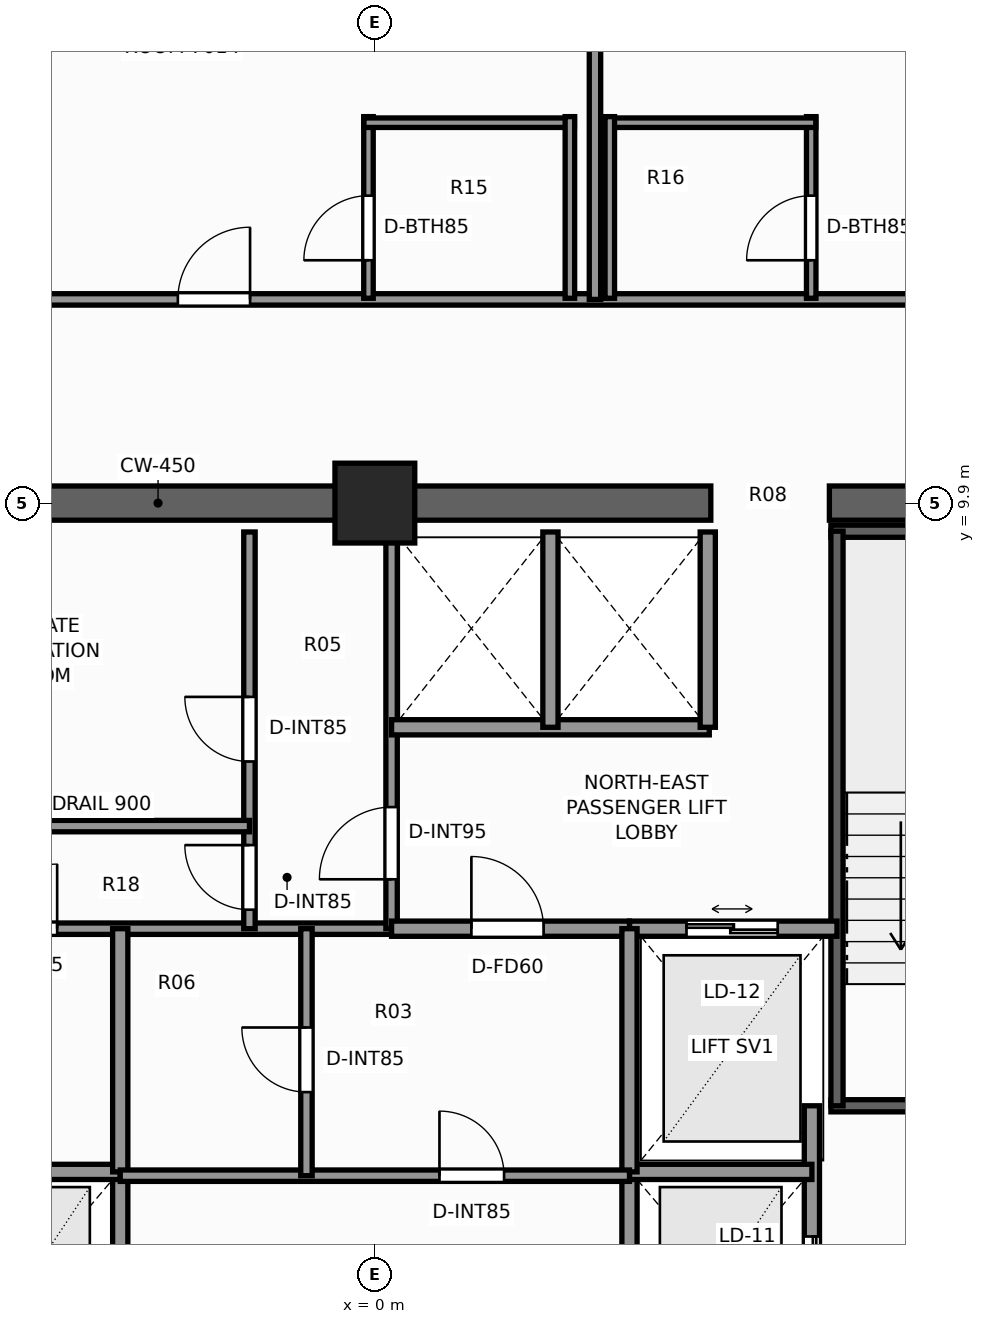
"""IFC4 building model, lengths in metres.
Left out: names, types, materials, properties, quantities, classifications, styles, units other than length and angle.
Written with IfcOpenShell. Run it as: python <this file> out.ifc"""

import sys

from ifc_helpers import new_model, si_unit, direction, frame, frame_2d, origin, origin_2d, place, context, subcontext, project, spatial, rectangle, extrude, element, fill, save


model = new_model("IFC4")
c1 = context("Model", 3, precision=1e-05, world=origin(), true_north=direction((0.0, 1.0)))
c2 = subcontext(c1, "Body", "Model", "MODEL_VIEW")
j1 = project(units=[si_unit("LENGTHUNIT", "METRE"), si_unit("PLANEANGLEUNIT", "RADIAN")], contexts=[c1])
p1 = place(None, origin())
s1 = spatial("IfcSite", under=j1, at=p1, CompositionType="ELEMENT")
p2 = place(p1, origin())
s2 = spatial("IfcBuilding", under=s1, at=p2, CompositionType="ELEMENT")
p3 = place(p2, frame((0.0, 0.0, 240.9)))
s3 = spatial("IfcBuildingStorey", under=s2, at=p3, CompositionType="ELEMENT", Elevation=240.9)
p4 = place(p3, frame((-10.125, 9.9, 0.0), z_axis=(0.0, 0.0, 1.0), x_axis=(1.0, 0.0, 0.0)))
e1 = element("IfcWall", 1, at=p4, inside=s3, PredefinedType="SHEAR", context=c2, shape_type="SweptSolid", body=[
    extrude(rectangle(XDim=14.545, YDim=0.45, at=frame_2d((7.272, 0.0))), origin(), (0.0, 0.0, 1.0), 3.5),
])
p5 = place(p3, frame((5.98, 9.9, 0.0), z_axis=(0.0, 0.0, 1.0), x_axis=(1.0, 0.0, 0.0)))
e2 = element("IfcWall", 2, at=p5, inside=s3, PredefinedType="SHEAR", context=c2, shape_type="SweptSolid", body=[
    extrude(rectangle(XDim=4.145, YDim=0.45, at=frame_2d((2.073, 0.0))), origin(), (0.0, 0.0, 1.0), 3.5),
])
p6 = place(p3, frame((0.0, 9.9, 0.0), z_axis=(0.0, 0.0, 1.0), x_axis=(1.0, 0.0, 0.0)))
e3 = element("IfcColumn", 3, at=p6, inside=s3, PredefinedType="COLUMN", context=c2, shape_type="SweptSolid", body=[
    extrude(rectangle(XDim=1.05, YDim=1.05, at=origin_2d()), origin(), (0.0, 0.0, 1.0), 3.5),
])
p7 = place(p3, frame((6.0, 1.97, 0.0), z_axis=(0.0, 0.0, 1.0), x_axis=(1.0, 0.0, 0.0)))
e4 = element("IfcWall", 4, at=p7, inside=s3, PredefinedType="SHEAR", context=c2, shape_type="SweptSolid", body=[
    extrude(rectangle(XDim=3.52, YDim=0.16, at=frame_2d((1.76, 0.0))), origin(), (0.0, 0.0, 1.0), 3.5),
])
p8 = place(p7, frame((1.15, 0.0, 0.0)))
e5 = element("IfcOpeningElement", 5, at=p8, cuts=e4, PredefinedType="OPENING", context=c2, shape_type="SweptSolid", body=[
    extrude(rectangle(XDim=1.1, YDim=2.2, at=frame_2d((0.55, 1.1))), frame((0.0, 0.09, 0.0), z_axis=(0.0, -1.0, 0.0), x_axis=(1.0, 0.0, 0.0)), (0.0, 0.0, 1.0), 0.18),
])
p9 = place(p3, frame((6.0, 9.53, 0.0), z_axis=(0.0, 0.0, 1.0), x_axis=(1.0, 0.0, 0.0)))
e6 = element("IfcWall", 6, at=p9, inside=s3, PredefinedType="SHEAR", context=c2, shape_type="SweptSolid", body=[
    extrude(rectangle(XDim=3.52, YDim=0.16, at=frame_2d((1.76, 0.0))), origin(), (0.0, 0.0, 1.0), 3.5),
])
p10 = place(p3, frame((6.08, 1.97, 0.0), z_axis=(0.0, 0.0, 1.0), x_axis=(0.0, 1.0, 0.0)))
e7 = element("IfcWall", 7, at=p10, inside=s3, PredefinedType="SHEAR", context=c2, shape_type="SweptSolid", body=[
    extrude(rectangle(XDim=7.56, YDim=0.16, at=frame_2d((3.78, 0.0))), origin(), (0.0, 0.0, 1.0), 3.5),
])
p11 = place(p3, frame((-3.35, -1.7, 0.0), z_axis=(0.0, 0.0, 1.0), x_axis=(0.0, 1.0, 0.0)))
e8 = element("IfcWall", 8, at=p11, inside=s3, PredefinedType="SOLIDWALL", context=c2, shape_type="SweptSolid", body=[
    extrude(rectangle(XDim=2.8, YDim=0.2, at=frame_2d((1.4, 0.0))), origin(), (0.0, 0.0, 1.0), 3.25),
])
p12 = place(p3, frame((-5.75, 1.1, 0.0), z_axis=(0.0, 0.0, 1.0), x_axis=(1.0, 0.0, 0.0)))
e9 = element("IfcWall", 9, at=p12, inside=s3, PredefinedType="SOLIDWALL", context=c2, shape_type="SweptSolid", body=[
    extrude(rectangle(XDim=2.4, YDim=0.2, at=frame_2d((1.2, 0.0))), origin(), (0.0, 0.0, 1.0), 3.25),
])
p13 = place(p3, frame((5.75, -3.6, 0.0), z_axis=(0.0, 0.0, 1.0), x_axis=(0.0, 1.0, 0.0)))
e10 = element("IfcWall", 10, at=p13, inside=s3, PredefinedType="SOLIDWALL", context=c2, shape_type="SweptSolid", body=[
    extrude(rectangle(XDim=5.57, YDim=0.2, at=frame_2d((2.785, 0.0))), origin(), (0.0, 0.0, 1.0), 3.25),
])
p14 = place(p13, frame((2.75, 0.0, 0.0)))
e11 = element("IfcOpeningElement", 11, at=p14, cuts=e10, PredefinedType="OPENING", context=c2, shape_type="SweptSolid", body=[
    extrude(rectangle(XDim=1.1, YDim=2.2, at=frame_2d((0.55, 1.1))), frame((0.0, 0.11, 0.0), z_axis=(0.0, -1.0, 0.0), x_axis=(1.0, 0.0, 0.0)), (0.0, 0.0, 1.0), 0.22),
])
p15 = place(p3, frame((3.35, -1.7, 0.0), z_axis=(0.0, 0.0, 1.0), x_axis=(0.0, 1.0, 0.0)))
e12 = element("IfcWall", 12, at=p15, inside=s3, PredefinedType="SOLIDWALL", context=c2, shape_type="SweptSolid", body=[
    extrude(rectangle(XDim=2.8, YDim=0.2, at=frame_2d((1.4, 0.0))), origin(), (0.0, 0.0, 1.0), 3.25),
])
p16 = place(p3, frame((3.35, 1.1, 0.0), z_axis=(0.0, 0.0, 1.0), x_axis=(1.0, 0.0, 0.0)))
e13 = element("IfcWall", 13, at=p16, inside=s3, PredefinedType="SOLIDWALL", context=c2, shape_type="SweptSolid", body=[
    extrude(rectangle(XDim=2.4, YDim=0.2, at=frame_2d((1.2, 0.0))), origin(), (0.0, 0.0, 1.0), 3.25),
])
p17 = place(p3, frame((3.35, 4.3, 0.0), z_axis=(0.0, 0.0, 1.0), x_axis=(1.0, 0.0, 0.0)))
e14 = element("IfcWall", 14, at=p17, inside=s3, PredefinedType="SOLIDWALL", context=c2, shape_type="SweptSolid", body=[
    extrude(rectangle(XDim=2.73, YDim=0.2, at=frame_2d((1.365, 0.0))), origin(), (0.0, 0.0, 1.0), 3.25),
])
p18 = place(p17, frame((0.75, 0.0, 0.0)))
e15 = element("IfcOpeningElement", 15, at=p18, cuts=e14, PredefinedType="OPENING", context=c2, shape_type="SweptSolid", body=[
    extrude(rectangle(XDim=1.2, YDim=2.25, at=frame_2d((0.6, 1.125))), frame((0.0, 0.11, 0.0), z_axis=(0.0, -1.0, 0.0), x_axis=(1.0, 0.0, 0.0)), (0.0, 0.0, 1.0), 0.22),
])
p19 = place(p3, frame((-6.08, 4.3, 0.0), z_axis=(0.0, 0.0, 1.0), x_axis=(1.0, 0.0, 0.0)))
e16 = element("IfcWall", 16, at=p19, inside=s3, PredefinedType="PARTITIONING", context=c2, shape_type="SweptSolid", body=[
    extrude(rectangle(XDim=6.3, YDim=0.15, at=frame_2d((3.15, 0.0))), origin(), (0.0, 0.0, 1.0), 3.25),
])
p20 = place(p19, frame((1.05, 0.0, 0.0)))
e17 = element("IfcOpeningElement", 17, at=p20, cuts=e16, PredefinedType="OPENING", context=c2, shape_type="SweptSolid", body=[
    extrude(rectangle(XDim=0.85, YDim=2.03, at=frame_2d((0.425, 1.015))), frame((0.0, 0.085, 0.0), z_axis=(0.0, -1.0, 0.0), x_axis=(1.0, 0.0, 0.0)), (0.0, 0.0, 1.0), 0.17),
])
p21 = place(p3, frame((0.22, 4.3, 0.0), z_axis=(0.0, 0.0, 1.0), x_axis=(0.0, 1.0, 0.0)))
e18 = element("IfcWall", 18, at=p21, inside=s3, PredefinedType="PARTITIONING", context=c2, shape_type="SweptSolid", body=[
    extrude(rectangle(XDim=5.22, YDim=0.15, at=frame_2d((2.61, 0.0))), origin(), (0.0, 0.0, 1.0), 3.25),
])
p22 = place(p21, frame((0.65, 0.0, 0.0)))
e19 = element("IfcOpeningElement", 19, at=p22, cuts=e18, PredefinedType="OPENING", context=c2, shape_type="SweptSolid", body=[
    extrude(rectangle(XDim=0.95, YDim=2.06, at=frame_2d((0.475, 1.03))), frame((0.0, 0.085, 0.0), z_axis=(0.0, -1.0, 0.0), x_axis=(1.0, 0.0, 0.0)), (0.0, 0.0, 1.0), 0.17),
])
p23 = place(p3, frame((-1.65, 4.3, 0.0), z_axis=(0.0, 0.0, 1.0), x_axis=(0.0, 1.0, 0.0)))
e20 = element("IfcWall", 20, at=p23, inside=s3, PredefinedType="PARTITIONING", context=c2, shape_type="SweptSolid", body=[
    extrude(rectangle(XDim=5.22, YDim=0.15, at=frame_2d((2.61, 0.0))), origin(), (0.0, 0.0, 1.0), 3.25),
])
p24 = place(p23, frame((2.2, 0.0, 0.0)))
e21 = element("IfcOpeningElement", 21, at=p24, cuts=e20, PredefinedType="OPENING", context=c2, shape_type="SweptSolid", body=[
    extrude(rectangle(XDim=0.85, YDim=2.03, at=frame_2d((0.425, 1.015))), frame((0.0, 0.085, 0.0), z_axis=(0.0, -1.0, 0.0), x_axis=(1.0, 0.0, 0.0)), (0.0, 0.0, 1.0), 0.17),
])
p25 = place(p23, frame((0.25, 0.0, 0.0)))
e22 = element("IfcOpeningElement", 22, at=p25, cuts=e20, PredefinedType="OPENING", context=c2, shape_type="SweptSolid", body=[
    extrude(rectangle(XDim=0.85, YDim=2.03, at=frame_2d((0.425, 1.015))), frame((0.0, 0.085, 0.0), z_axis=(0.0, -1.0, 0.0), x_axis=(1.0, 0.0, 0.0)), (0.0, 0.0, 1.0), 0.17),
])
p26 = place(p3, frame((-6.08, 5.65, 0.0), z_axis=(0.0, 0.0, 1.0), x_axis=(1.0, 0.0, 0.0)))
e23 = element("IfcWall", 23, at=p26, inside=s3, PredefinedType="PARTITIONING", context=c2, shape_type="SweptSolid", body=[
    extrude(rectangle(XDim=4.43, YDim=0.15, at=frame_2d((2.215, 0.0))), origin(), (0.0, 0.0, 1.0), 3.25),
])
p27 = place(p3, frame((0.22, 6.95, 0.0), z_axis=(0.0, 0.0, 1.0), x_axis=(1.0, 0.0, 0.0)))
e24 = element("IfcWall", 24, at=p27, inside=s3, PredefinedType="SOLIDWALL", context=c2, shape_type="SweptSolid", body=[
    extrude(rectangle(XDim=4.18, YDim=0.2, at=frame_2d((2.09, 0.0))), origin(), (0.0, 0.0, 1.0), 3.25),
])
for number, where, z_axis, x_axis in (
    (25, (4.38, 6.95, 0.0), (0.0, 0.0, 1.0), (0.0, 1.0, 0.0)),
    (26, (2.31, 6.95, 0.0), (0.0, 0.0, 1.0), (0.0, 1.0, 0.0)),
):
    element("IfcWall", number, at=place(p3, frame(where, z_axis=z_axis, x_axis=x_axis)), inside=s3, PredefinedType="SOLIDWALL", context=c2, shape_type="SweptSolid", body=[
        extrude(rectangle(XDim=2.57, YDim=0.2, at=frame_2d((1.285, 0.0))), origin(), (0.0, 0.0, 1.0), 3.25),
    ])
p28 = place(p3, frame((0.22, 4.3, 0.0), z_axis=(0.0, 0.0, 1.0), x_axis=(1.0, 0.0, 0.0)))
e27 = element("IfcWall", 27, at=p28, inside=s3, PredefinedType="SOLIDWALL", context=c2, shape_type="SweptSolid", body=[
    extrude(rectangle(XDim=3.13, YDim=0.2, at=frame_2d((1.565, 0.0))), origin(), (0.0, 0.0, 1.0), 3.25),
])
p29 = place(p28, frame((1.05, 0.0, 0.0)))
e28 = element("IfcOpeningElement", 28, at=p29, cuts=e27, PredefinedType="OPENING", context=c2, shape_type="SweptSolid", body=[
    extrude(rectangle(XDim=0.95, YDim=2.06, at=frame_2d((0.475, 1.03))), frame((0.0, 0.11, 0.0), z_axis=(0.0, -1.0, 0.0), x_axis=(1.0, 0.0, 0.0)), (0.0, 0.0, 1.0), 0.22),
])
for number, where, z_axis, x_axis in (
    (29, (-3.35, 1.1, 0.0), (0.0, 0.0, 1.0), (0.0, 1.0, 0.0)),
    (30, (3.35, 1.1, 0.0), (0.0, 0.0, 1.0), (0.0, 1.0, 0.0)),
):
    element("IfcWall", number, at=place(p3, frame(where, z_axis=z_axis, x_axis=x_axis)), inside=s3, PredefinedType="SOLIDWALL", context=c2, shape_type="SweptSolid", body=[
        extrude(rectangle(XDim=3.2, YDim=0.2, at=frame_2d((1.6, 0.0))), origin(), (0.0, 0.0, 1.0), 3.25),
    ])
p30 = place(p3, frame((-3.35, 1.05, 0.0), z_axis=(0.0, 0.0, 1.0), x_axis=(1.0, 0.0, 0.0)))
e31 = element("IfcWall", 31, at=p30, inside=s3, PredefinedType="PARTITIONING", context=c2, shape_type="SweptSolid", body=[
    extrude(rectangle(XDim=6.7, YDim=0.15, at=frame_2d((3.35, 0.0))), origin(), (0.0, 0.0, 1.0), 3.25),
])
p31 = place(p30, frame((4.2, 0.0, 0.0)))
e32 = element("IfcOpeningElement", 32, at=p31, cuts=e31, PredefinedType="OPENING", context=c2, shape_type="SweptSolid", body=[
    extrude(rectangle(XDim=0.85, YDim=2.03, at=frame_2d((0.425, 1.015))), frame((0.0, 0.085, 0.0), z_axis=(0.0, -1.0, 0.0), x_axis=(1.0, 0.0, 0.0)), (0.0, 0.0, 1.0), 0.17),
])
p32 = place(p3, frame((-0.9, 1.05, 0.0), z_axis=(0.0, 0.0, 1.0), x_axis=(0.0, 1.0, 0.0)))
e33 = element("IfcWall", 33, at=p32, inside=s3, PredefinedType="PARTITIONING", context=c2, shape_type="SweptSolid", body=[
    extrude(rectangle(XDim=3.25, YDim=0.15, at=frame_2d((1.625, 0.0))), origin(), (0.0, 0.0, 1.0), 3.25),
])
p33 = place(p32, frame((1.1, 0.0, 0.0)))
e34 = element("IfcOpeningElement", 34, at=p33, cuts=e33, PredefinedType="OPENING", context=c2, shape_type="SweptSolid", body=[
    extrude(rectangle(XDim=0.85, YDim=2.03, at=frame_2d((0.425, 1.015))), frame((0.0, 0.085, 0.0), z_axis=(0.0, -1.0, 0.0), x_axis=(1.0, 0.0, 0.0)), (0.0, 0.0, 1.0), 0.17),
])
p34 = place(p3, frame((-12.58, 12.58, 0.0), z_axis=(0.0, 0.0, 1.0), x_axis=(1.0, 0.0, 0.0)))
e35 = element("IfcWall", 35, at=p34, inside=s3, PredefinedType="PARTITIONING", context=c2, shape_type="SweptSolid", body=[
    extrude(rectangle(XDim=24.84, YDim=0.15, at=frame_2d((12.42, 0.0))), origin(), (0.0, 0.0, 1.0), 2.539),
])
p35 = place(p34, frame((3.321, 0.0, 0.0)))
e36 = element("IfcOpeningElement", 36, at=p35, cuts=e35, PredefinedType="OPENING", context=c2, shape_type="SweptSolid", body=[
    extrude(rectangle(XDim=0.95, YDim=2.06, at=frame_2d((0.475, 1.03))), frame((0.0, 0.085, 0.0), z_axis=(0.0, -1.0, 0.0), x_axis=(1.0, 0.0, 0.0)), (0.0, 0.0, 1.0), 0.17),
])
p36 = place(p34, frame((9.988, 0.0, 0.0)))
e37 = element("IfcOpeningElement", 37, at=p36, cuts=e35, PredefinedType="OPENING", context=c2, shape_type="SweptSolid", body=[
    extrude(rectangle(XDim=0.95, YDim=2.06, at=frame_2d((0.475, 1.03))), frame((0.0, 0.085, 0.0), z_axis=(0.0, -1.0, 0.0), x_axis=(1.0, 0.0, 0.0)), (0.0, 0.0, 1.0), 0.17),
])
p37 = place(p34, frame((19.986, 0.0, 0.0)))
e38 = element("IfcOpeningElement", 38, at=p37, cuts=e35, PredefinedType="OPENING", context=c2, shape_type="SweptSolid", body=[
    extrude(rectangle(XDim=0.95, YDim=2.06, at=frame_2d((0.475, 1.03))), frame((0.0, 0.085, 0.0), z_axis=(0.0, -1.0, 0.0), x_axis=(1.0, 0.0, 0.0)), (0.0, 0.0, 1.0), 0.17),
])
p38 = place(p3, frame((2.896, 12.58, 0.0), z_axis=(0.0, 0.0, 1.0), x_axis=(0.0, 1.0, 0.0)))
e39 = element("IfcWall", 39, at=p38, inside=s3, PredefinedType="PARTITIONING", context=c2, shape_type="SweptSolid", body=[
    extrude(rectangle(XDim=5.8, YDim=0.15, at=frame_2d((2.9, 0.0))), origin(), (0.0, 0.0, 1.0), 2.623),
])
p39 = place(p3, frame((-0.084, 12.595, 0.0), z_axis=(0.0, 0.0, 1.0), x_axis=(0.0, 1.0, 0.0)))
e40 = element("IfcWall", 40, at=p39, inside=s3, PredefinedType="PARTITIONING", context=c2, shape_type="SweptSolid", body=[
    extrude(rectangle(XDim=2.39, YDim=0.125, at=frame_2d((1.195, 0.0))), origin(), (0.0, 0.0, 1.0), 2.775),
])
p40 = place(p39, frame((0.5, 0.0, 0.0)))
e41 = element("IfcOpeningElement", 41, at=p40, cuts=e40, PredefinedType="OPENING", context=c2, shape_type="SweptSolid", body=[
    extrude(rectangle(XDim=0.85, YDim=2.03, at=frame_2d((0.425, 1.015))), frame((0.0, 0.073, 0.0), z_axis=(0.0, -1.0, 0.0), x_axis=(1.0, 0.0, 0.0)), (0.0, 0.0, 1.0), 0.145),
])
p41 = place(p3, frame((-0.144, 14.905, 0.0), z_axis=(0.0, 0.0, 1.0), x_axis=(1.0, 0.0, 0.0)))
e42 = element("IfcWall", 42, at=p41, inside=s3, PredefinedType="PARTITIONING", context=c2, shape_type="SweptSolid", body=[
    extrude(rectangle(XDim=2.77, YDim=0.125, at=frame_2d((1.385, 0.0))), origin(), (0.0, 0.0, 1.0), 2.775),
])
p42 = place(p3, frame((2.566, 12.595, 0.0), z_axis=(0.0, 0.0, 1.0), x_axis=(0.0, 1.0, 0.0)))
e43 = element("IfcWall", 43, at=p42, inside=s3, PredefinedType="PARTITIONING", context=c2, shape_type="SweptSolid", body=[
    extrude(rectangle(XDim=2.39, YDim=0.125, at=frame_2d((1.195, 0.0))), origin(), (0.0, 0.0, 1.0), 3.25),
])
p43 = place(p3, frame((5.741, 12.595, 0.0), z_axis=(0.0, 0.0, 1.0), x_axis=(0.0, 1.0, 0.0)))
e44 = element("IfcWall", 44, at=p43, inside=s3, PredefinedType="PARTITIONING", context=c2, shape_type="SweptSolid", body=[
    extrude(rectangle(XDim=2.39, YDim=0.125, at=frame_2d((1.195, 0.0))), origin(), (0.0, 0.0, 1.0), 3.25),
])
p44 = place(p43, frame((0.5, 0.0, 0.0)))
e45 = element("IfcOpeningElement", 45, at=p44, cuts=e44, PredefinedType="OPENING", context=c2, shape_type="SweptSolid", body=[
    extrude(rectangle(XDim=0.85, YDim=2.03, at=frame_2d((0.425, 1.015))), frame((0.0, 0.073, 0.0), z_axis=(0.0, -1.0, 0.0), x_axis=(1.0, 0.0, 0.0)), (0.0, 0.0, 1.0), 0.145),
])
p45 = place(p3, frame((3.031, 14.905, 0.0), z_axis=(0.0, 0.0, 1.0), x_axis=(1.0, 0.0, 0.0)))
e46 = element("IfcWall", 46, at=p45, inside=s3, PredefinedType="PARTITIONING", context=c2, shape_type="SweptSolid", body=[
    extrude(rectangle(XDim=2.77, YDim=0.125, at=frame_2d((1.385, 0.0))), origin(), (0.0, 0.0, 1.0), 2.539),
])
p46 = place(p3, frame((3.091, 12.595, 0.0), z_axis=(0.0, 0.0, 1.0), x_axis=(0.0, 1.0, 0.0)))
e47 = element("IfcWall", 47, at=p46, inside=s3, PredefinedType="PARTITIONING", context=c2, shape_type="SweptSolid", body=[
    extrude(rectangle(XDim=2.39, YDim=0.125, at=frame_2d((1.195, 0.0))), origin(), (0.0, 0.0, 1.0), 3.25),
])
p47 = place(p14, origin())
e48 = element("IfcDoor", 48, at=p47, inside=s3, OperationType="DOUBLE_DOOR_SLIDING", PredefinedType="DOOR", context=c2, shape_type="SweptSolid", body=[
    extrude(rectangle(XDim=1.1, YDim=2.2, at=frame_2d((0.55, 1.1))), frame((0.0, 0.025, 0.0), z_axis=(0.0, -1.0, 0.0), x_axis=(1.0, 0.0, 0.0)), (0.0, 0.0, 1.0), 0.05),
])
fill(e11, e48)
p48 = place(p18, origin())
e49 = element("IfcDoor", 49, at=p48, inside=s3, OperationType="DOUBLE_DOOR_SLIDING", PredefinedType="DOOR", context=c2, shape_type="SweptSolid", body=[
    extrude(rectangle(XDim=1.2, YDim=2.25, at=frame_2d((0.6, 1.125))), frame((0.0, 0.025, 0.0), z_axis=(0.0, -1.0, 0.0), x_axis=(1.0, 0.0, 0.0)), (0.0, 0.0, 1.0), 0.05),
])
fill(e15, e49)
p49 = place(p22, origin())
e50 = element("IfcDoor", 50, at=p49, inside=s3, OperationType="SINGLE_SWING_LEFT", PredefinedType="DOOR", context=c2, shape_type="SweptSolid", body=[
    extrude(rectangle(XDim=0.95, YDim=2.06, at=frame_2d((0.475, 1.03))), frame((0.0, 0.025, 0.0), z_axis=(0.0, -1.0, 0.0), x_axis=(1.0, 0.0, 0.0)), (0.0, 0.0, 1.0), 0.05),
])
fill(e19, e50)
p50 = place(p24, origin())
e51 = element("IfcDoor", 51, at=p50, inside=s3, OperationType="SINGLE_SWING_RIGHT", PredefinedType="DOOR", context=c2, shape_type="SweptSolid", body=[
    extrude(rectangle(XDim=0.85, YDim=2.03, at=frame_2d((0.425, 1.015))), frame((0.0, 0.025, 0.0), z_axis=(0.0, -1.0, 0.0), x_axis=(1.0, 0.0, 0.0)), (0.0, 0.0, 1.0), 0.05),
])
fill(e21, e51)
p51 = place(p25, origin())
e52 = element("IfcDoor", 52, at=p51, inside=s3, OperationType="SINGLE_SWING_RIGHT", PredefinedType="DOOR", context=c2, shape_type="SweptSolid", body=[
    extrude(rectangle(XDim=0.85, YDim=2.03, at=frame_2d((0.425, 1.015))), frame((0.0, 0.025, 0.0), z_axis=(0.0, -1.0, 0.0), x_axis=(1.0, 0.0, 0.0)), (0.0, 0.0, 1.0), 0.05),
])
fill(e22, e52)
p52 = place(p29, origin())
e53 = element("IfcDoor", 53, at=p52, inside=s3, OperationType="SINGLE_SWING_LEFT", PredefinedType="DOOR", context=c2, shape_type="SweptSolid", body=[
    extrude(rectangle(XDim=0.95, YDim=2.06, at=frame_2d((0.475, 1.03))), frame((0.0, 0.025, 0.0), z_axis=(0.0, -1.0, 0.0), x_axis=(1.0, 0.0, 0.0)), (0.0, 0.0, 1.0), 0.05),
])
fill(e28, e53)
p53 = place(p31, origin())
e54 = element("IfcDoor", 54, at=p53, inside=s3, OperationType="SINGLE_SWING_LEFT", PredefinedType="DOOR", context=c2, shape_type="SweptSolid", body=[
    extrude(rectangle(XDim=0.85, YDim=2.03, at=frame_2d((0.425, 1.015))), frame((0.0, 0.025, 0.0), z_axis=(0.0, -1.0, 0.0), x_axis=(1.0, 0.0, 0.0)), (0.0, 0.0, 1.0), 0.05),
])
fill(e32, e54)
p54 = place(p33, origin())
e55 = element("IfcDoor", 55, at=p54, inside=s3, OperationType="SINGLE_SWING_RIGHT", PredefinedType="DOOR", context=c2, shape_type="SweptSolid", body=[
    extrude(rectangle(XDim=0.85, YDim=2.03, at=frame_2d((0.425, 1.015))), frame((0.0, 0.025, 0.0), z_axis=(0.0, -1.0, 0.0), x_axis=(1.0, 0.0, 0.0)), (0.0, 0.0, 1.0), 0.05),
])
fill(e34, e55)
p55 = place(p20, origin())
e56 = element("IfcDoor", 56, at=p55, inside=s3, OperationType="SINGLE_SWING_RIGHT", PredefinedType="DOOR", context=c2, shape_type="SweptSolid", body=[
    extrude(rectangle(XDim=0.85, YDim=2.03, at=frame_2d((0.425, 1.015))), frame((0.0, 0.025, 0.0), z_axis=(0.0, -1.0, 0.0), x_axis=(1.0, 0.0, 0.0)), (0.0, 0.0, 1.0), 0.05),
])
fill(e17, e56)
p56 = place(p40, origin())
e57 = element("IfcDoor", 57, at=p56, inside=s3, OperationType="SINGLE_SWING_LEFT", PredefinedType="DOOR", context=c2, shape_type="SweptSolid", body=[
    extrude(rectangle(XDim=0.85, YDim=2.03, at=frame_2d((0.425, 1.015))), frame((0.0, 0.025, 0.0), z_axis=(0.0, -1.0, 0.0), x_axis=(1.0, 0.0, 0.0)), (0.0, 0.0, 1.0), 0.05),
])
fill(e41, e57)
p57 = place(p36, origin())
e58 = element("IfcDoor", 58, at=p57, inside=s3, OperationType="SINGLE_SWING_RIGHT", PredefinedType="DOOR", context=c2, shape_type="SweptSolid", body=[
    extrude(rectangle(XDim=0.95, YDim=2.06, at=frame_2d((0.475, 1.03))), frame((0.0, 0.025, 0.0), z_axis=(0.0, -1.0, 0.0), x_axis=(1.0, 0.0, 0.0)), (0.0, 0.0, 1.0), 0.05),
])
fill(e37, e58)
p58 = place(p44, origin())
e59 = element("IfcDoor", 59, at=p58, inside=s3, OperationType="SINGLE_SWING_LEFT", PredefinedType="DOOR", context=c2, shape_type="SweptSolid", body=[
    extrude(rectangle(XDim=0.85, YDim=2.03, at=frame_2d((0.425, 1.015))), frame((0.0, 0.025, 0.0), z_axis=(0.0, -1.0, 0.0), x_axis=(1.0, 0.0, 0.0)), (0.0, 0.0, 1.0), 0.05),
])
fill(e45, e59)
save(model, sys.argv[1])
